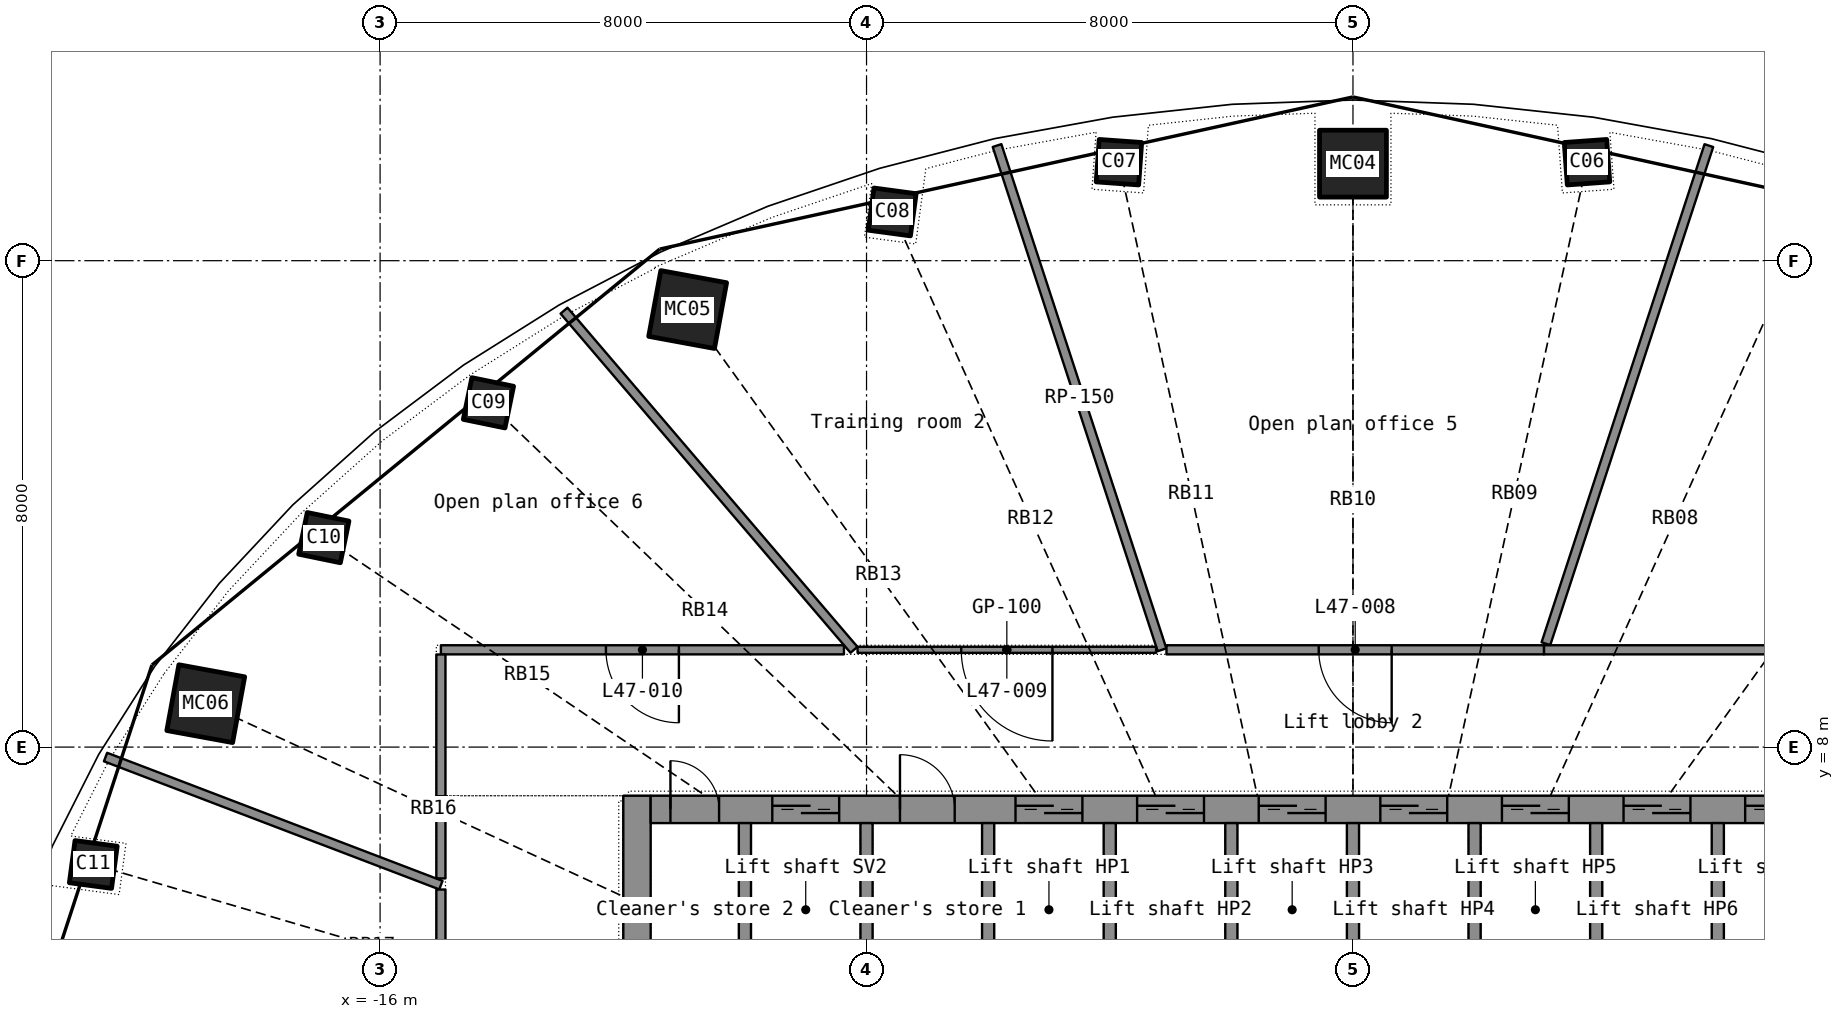
"""IFC4 building model, lengths in metres.
Left out: names, types, materials, properties, quantities, classifications, styles, units other than length and angle.
Written with IfcOpenShell. Run it as: python <this file> out.ifc"""

import sys

from ifc_helpers import new_model, si_unit, direction, frame, frame_2d, origin, origin_2d, place, context, subcontext, project, spatial, rectangle, hollow_rectangle, extrude, element, fill, save


model = new_model("IFC4")
c1 = context("Model", 3, precision=1e-05, world=origin(), true_north=direction((0.0, 1.0)))
c2 = subcontext(c1, "Body", "Model", "MODEL_VIEW")
j1 = project(units=[si_unit("LENGTHUNIT", "METRE"), si_unit("PLANEANGLEUNIT", "RADIAN")], contexts=[c1])
p1 = place(None, origin())
s1 = spatial("IfcSite", under=j1, at=p1, CompositionType="ELEMENT")
p2 = place(p1, origin())
s2 = spatial("IfcBuilding", under=s1, at=p2, CompositionType="ELEMENT")
p3 = place(p2, frame((0.0, 0.0, 194.1)))
s3 = spatial("IfcBuildingStorey", under=s2, at=p3, CompositionType="ELEMENT", Elevation=194.1)
p4 = place(p3, frame((3.849, 17.62, 0.0), z_axis=(-0.006002173, -0.027900212, 0.999592693), x_axis=(0.990171856, -0.139841068, 0.002042419)))
e1 = element("IfcColumn", 1, at=p4, inside=s3, PredefinedType="COLUMN", context=c2, shape_type="SweptSolid", body=[
    extrude(hollow_rectangle(XDim=0.7, YDim=0.7, WallThickness=0.025, at=origin_2d()), origin(), (0.0, 0.0, 1.0), 3.701),
])
p5 = place(p3, frame((0.0, 17.596, 0.0), z_axis=(0.0, -0.02836206, 0.999597716), x_axis=(1.0, 0.0, 0.0)))
e2 = element("IfcColumn", 2, at=p5, inside=s3, PredefinedType="COLUMN", context=c2, shape_type="SweptSolid", body=[
    extrude(hollow_rectangle(XDim=1.1, YDim=1.1, WallThickness=0.032, at=origin_2d()), origin(), (0.0, 0.0, 1.0), 3.701),
])
for number, where, z_axis, x_axis in (
    (3, (-3.849, 17.62, 0.0), (0.006, -0.028, 1.0), (0.99, 0.14, -0.002)),
    (4, (-7.578, 16.802, 0.0), (0.012, -0.027, 1.0), (0.96, 0.281, -0.004)),
):
    element("IfcColumn", number, at=place(p3, frame(where, z_axis=z_axis, x_axis=x_axis)), inside=s3, PredefinedType="COLUMN", context=c2, shape_type="SweptSolid", body=[
        extrude(hollow_rectangle(XDim=0.7, YDim=0.7, WallThickness=0.025, at=origin_2d()), origin(), (0.0, 0.0, 1.0), 3.701),
    ])
p6 = place(p3, frame((-10.942, 15.197, 0.0), z_axis=(0.017280237, -0.024535299, 0.999549605), x_axis=(0.908373055, 0.418125333, -0.005440522)))
e5 = element("IfcColumn", 5, at=p6, inside=s3, PredefinedType="COLUMN", context=c2, shape_type="SweptSolid", body=[
    extrude(hollow_rectangle(XDim=1.1, YDim=1.1, WallThickness=0.032, at=origin_2d()), origin(), (0.0, 0.0, 1.0), 3.702),
])
p7 = place(p3, frame((-14.218, 13.662, 0.0), z_axis=(0.022226156, -0.021698532, 0.999517469), x_axis=(0.828497152, 0.559958207, -0.00626706)))
e6 = element("IfcColumn", 6, at=p7, inside=s3, PredefinedType="COLUMN", context=c2, shape_type="SweptSolid", body=[
    extrude(hollow_rectangle(XDim=0.7, YDim=0.7, WallThickness=0.025, at=origin_2d()), origin(), (0.0, 0.0, 1.0), 3.702),
])
p8 = place(p3, frame((-16.926, 11.445, 0.0), z_axis=(0.026512179, -0.018202391, 0.999482755), x_axis=(0.720419372, 0.693508429, -0.006479727)))
e7 = element("IfcColumn", 7, at=p8, inside=s3, PredefinedType="COLUMN", context=c2, shape_type="SweptSolid", body=[
    extrude(hollow_rectangle(XDim=0.7, YDim=0.7, WallThickness=0.025, at=origin_2d()), origin(), (0.0, 0.0, 1.0), 3.702),
])
p9 = place(p3, frame((-18.867, 8.714, 0.0), z_axis=(0.029940667, -0.01417895, 0.999451106), x_axis=(0.583859188, 0.811832967, -0.005973473)))
e8 = element("IfcColumn", 8, at=p9, inside=s3, PredefinedType="COLUMN", context=c2, shape_type="SweptSolid", body=[
    extrude(hollow_rectangle(XDim=1.1, YDim=1.1, WallThickness=0.032, at=origin_2d()), origin(), (0.0, 0.0, 1.0), 3.702),
])
p10 = place(p3, frame((-20.717, 6.07, 0.0), z_axis=(0.032511791, -0.009694185, 0.999424337), x_axis=(0.410362909, 0.911911178, -0.00450399)))
e9 = element("IfcColumn", 9, at=p10, inside=s3, PredefinedType="COLUMN", context=c2, shape_type="SweptSolid", body=[
    extrude(hollow_rectangle(XDim=0.7, YDim=0.7, WallThickness=0.025, at=origin_2d()), origin(), (0.0, 0.0, 1.0), 3.702),
])
p11 = place(p3, frame((-11.775, -7.2, 0.0), z_axis=(0.0, 0.0, 1.0), x_axis=(0.0, 1.0, 0.0)))
e10 = element("IfcWall", 10, at=p11, inside=s3, PredefinedType="SHEAR", context=c2, shape_type="SweptSolid", body=[
    extrude(rectangle(XDim=14.4, YDim=0.45, at=frame_2d((7.2, 0.0))), origin(), (0.0, 0.0, 1.0), 3.3),
])
p12 = place(p11, frame((6.5, 0.0, 0.0)))
e11 = element("IfcOpeningElement", 11, at=p12, cuts=e10, PredefinedType="OPENING", context=c2, shape_type="SweptSolid", body=[
    extrude(rectangle(XDim=1.4, YDim=2.2, at=frame_2d((0.7, 1.1))), frame((0.0, 0.235, 0.0), z_axis=(0.0, -1.0, 0.0), x_axis=(1.0, 0.0, 0.0)), (0.0, 0.0, 1.0), 0.47),
])
p13 = place(p3, frame((-11.55, 6.975, 0.0), z_axis=(0.0, 0.0, 1.0), x_axis=(1.0, 0.0, 0.0)))
e12 = element("IfcWall", 12, at=p13, inside=s3, PredefinedType="SHEAR", context=c2, shape_type="SweptSolid", body=[
    extrude(rectangle(XDim=23.1, YDim=0.45, at=frame_2d((11.55, 0.0))), origin(), (0.0, 0.0, 1.0), 3.3),
])
p14 = place(p13, frame((2.0, 0.0, 0.0)))
e13 = element("IfcOpeningElement", 13, at=p14, cuts=e12, PredefinedType="OPENING", context=c2, shape_type="SweptSolid", body=[
    extrude(rectangle(XDim=1.1, YDim=2.2, at=frame_2d((0.55, 1.1))), frame((0.0, 0.235, 0.0), z_axis=(0.0, -1.0, 0.0), x_axis=(1.0, 0.0, 0.0)), (0.0, 0.0, 1.0), 0.47),
])
p15 = place(p13, frame((6.0, 0.0, 0.0)))
e14 = element("IfcOpeningElement", 14, at=p15, cuts=e12, PredefinedType="OPENING", context=c2, shape_type="SweptSolid", body=[
    extrude(rectangle(XDim=1.1, YDim=2.2, at=frame_2d((0.55, 1.1))), frame((0.0, 0.235, 0.0), z_axis=(0.0, -1.0, 0.0), x_axis=(1.0, 0.0, 0.0)), (0.0, 0.0, 1.0), 0.47),
])
p16 = place(p13, frame((8.0, 0.0, 0.0)))
e15 = element("IfcOpeningElement", 15, at=p16, cuts=e12, PredefinedType="OPENING", context=c2, shape_type="SweptSolid", body=[
    extrude(rectangle(XDim=1.1, YDim=2.2, at=frame_2d((0.55, 1.1))), frame((0.0, 0.235, 0.0), z_axis=(0.0, -1.0, 0.0), x_axis=(1.0, 0.0, 0.0)), (0.0, 0.0, 1.0), 0.47),
])
p17 = place(p13, frame((10.0, 0.0, 0.0)))
e16 = element("IfcOpeningElement", 16, at=p17, cuts=e12, PredefinedType="OPENING", context=c2, shape_type="SweptSolid", body=[
    extrude(rectangle(XDim=1.1, YDim=2.2, at=frame_2d((0.55, 1.1))), frame((0.0, 0.235, 0.0), z_axis=(0.0, -1.0, 0.0), x_axis=(1.0, 0.0, 0.0)), (0.0, 0.0, 1.0), 0.47),
])
p18 = place(p13, frame((12.0, 0.0, 0.0)))
e17 = element("IfcOpeningElement", 17, at=p18, cuts=e12, PredefinedType="OPENING", context=c2, shape_type="SweptSolid", body=[
    extrude(rectangle(XDim=1.1, YDim=2.2, at=frame_2d((0.55, 1.1))), frame((0.0, 0.235, 0.0), z_axis=(0.0, -1.0, 0.0), x_axis=(1.0, 0.0, 0.0)), (0.0, 0.0, 1.0), 0.47),
])
p19 = place(p13, frame((14.0, 0.0, 0.0)))
e18 = element("IfcOpeningElement", 18, at=p19, cuts=e12, PredefinedType="OPENING", context=c2, shape_type="SweptSolid", body=[
    extrude(rectangle(XDim=1.1, YDim=2.2, at=frame_2d((0.55, 1.1))), frame((0.0, 0.235, 0.0), z_axis=(0.0, -1.0, 0.0), x_axis=(1.0, 0.0, 0.0)), (0.0, 0.0, 1.0), 0.47),
])
p20 = place(p13, frame((16.0, 0.0, 0.0)))
e19 = element("IfcOpeningElement", 19, at=p20, cuts=e12, PredefinedType="OPENING", context=c2, shape_type="SweptSolid", body=[
    extrude(rectangle(XDim=1.1, YDim=2.2, at=frame_2d((0.55, 1.1))), frame((0.0, 0.235, 0.0), z_axis=(0.0, -1.0, 0.0), x_axis=(1.0, 0.0, 0.0)), (0.0, 0.0, 1.0), 0.47),
])
p21 = place(p13, frame((18.0, 0.0, 0.0)))
e20 = element("IfcOpeningElement", 20, at=p21, cuts=e12, PredefinedType="OPENING", context=c2, shape_type="SweptSolid", body=[
    extrude(rectangle(XDim=1.1, YDim=2.2, at=frame_2d((0.55, 1.1))), frame((0.0, 0.235, 0.0), z_axis=(0.0, -1.0, 0.0), x_axis=(1.0, 0.0, 0.0)), (0.0, 0.0, 1.0), 0.47),
])
p22 = place(p13, frame((20.0, 0.0, 0.0)))
e21 = element("IfcOpeningElement", 21, at=p22, cuts=e12, PredefinedType="OPENING", context=c2, shape_type="SweptSolid", body=[
    extrude(rectangle(XDim=1.1, YDim=2.2, at=frame_2d((0.55, 1.1))), frame((0.0, 0.235, 0.0), z_axis=(0.0, -1.0, 0.0), x_axis=(1.0, 0.0, 0.0)), (0.0, 0.0, 1.0), 0.47),
])
p23 = place(p13, frame((4.1, 0.0, 0.0)))
e22 = element("IfcOpeningElement", 22, at=p23, cuts=e12, PredefinedType="OPENING", context=c2, shape_type="SweptSolid", body=[
    extrude(rectangle(XDim=0.9, YDim=2.1, at=frame_2d((0.45, 1.05))), frame((0.0, 0.235, 0.0), z_axis=(0.0, -1.0, 0.0), x_axis=(1.0, 0.0, 0.0)), (0.0, 0.0, 1.0), 0.47),
])
p24 = place(p13, frame((0.325, 0.0, 0.0)))
e23 = element("IfcOpeningElement", 23, at=p24, cuts=e12, PredefinedType="OPENING", context=c2, shape_type="SweptSolid", body=[
    extrude(rectangle(XDim=0.8, YDim=2.05, at=frame_2d((0.4, 1.025))), frame((0.0, 0.235, 0.0), z_axis=(0.0, -1.0, 0.0), x_axis=(1.0, 0.0, 0.0)), (0.0, 0.0, 1.0), 0.47),
])
p25 = place(p13, frame((21.975, 0.0, 0.0)))
e24 = element("IfcOpeningElement", 24, at=p25, cuts=e12, PredefinedType="OPENING", context=c2, shape_type="SweptSolid", body=[
    extrude(rectangle(XDim=0.8, YDim=2.05, at=frame_2d((0.4, 1.025))), frame((0.0, 0.235, 0.0), z_axis=(0.0, -1.0, 0.0), x_axis=(1.0, 0.0, 0.0)), (0.0, 0.0, 1.0), 0.47),
])
for number, where, z_axis, x_axis in (
    (25, (-10.0, 3.9, 0.0), (0.0, 0.0, 1.0), (0.0, 1.0, 0.0)),
    (26, (-8.0, 3.9, 0.0), (0.0, 0.0, 1.0), (0.0, 1.0, 0.0)),
    (27, (-6.0, 3.9, 0.0), (0.0, 0.0, 1.0), (0.0, 1.0, 0.0)),
    (28, (-4.0, 3.9, 0.0), (0.0, 0.0, 1.0), (0.0, 1.0, 0.0)),
    (29, (-2.0, 3.9, 0.0), (0.0, 0.0, 1.0), (0.0, 1.0, 0.0)),
    (30, (0.0, 3.9, 0.0), (0.0, 0.0, 1.0), (0.0, 1.0, 0.0)),
    (31, (2.0, 3.9, 0.0), (0.0, 0.0, 1.0), (0.0, 1.0, 0.0)),
    (32, (4.0, 3.9, 0.0), (0.0, 0.0, 1.0), (0.0, 1.0, 0.0)),
    (33, (6.0, 3.9, 0.0), (0.0, 0.0, 1.0), (0.0, 1.0, 0.0)),
):
    element("IfcWall", number, at=place(p3, frame(where, z_axis=z_axis, x_axis=x_axis)), inside=s3, PredefinedType="SHEAR", context=c2, shape_type="SweptSolid", body=[
        extrude(rectangle(XDim=2.85, YDim=0.2, at=frame_2d((1.425, 0.0))), origin(), (0.0, 0.0, 1.0), 3.3),
    ])
p26 = place(p3, frame((15.0, 9.6, 0.0), z_axis=(0.0, 0.0, 1.0), x_axis=(-1.0, 0.0, 0.0)))
e34 = element("IfcWall", 34, at=p26, inside=s3, PredefinedType="PARTITIONING", context=c2, shape_type="SweptSolid", body=[
    extrude(rectangle(XDim=11.86, YDim=0.15, at=frame_2d((5.93, 0.0))), origin(), (0.0, 0.0, 1.0), 2.4),
])
p27 = place(p26, frame((5.33, 0.0, 0.0)))
e35 = element("IfcOpeningElement", 35, at=p27, cuts=e34, PredefinedType="OPENING", context=c2, shape_type="SweptSolid", body=[
    extrude(rectangle(XDim=1.2, YDim=2.2, at=frame_2d((0.6, 1.1))), frame((0.0, 0.085, 0.0), z_axis=(0.0, -1.0, 0.0), x_axis=(1.0, 0.0, 0.0)), (0.0, 0.0, 1.0), 0.17),
])
p28 = place(p3, frame((-5.854, 17.894, 0.0), z_axis=(0.0, 0.0, 1.0), x_axis=(0.310918216, -0.95043667, 0.0)))
e36 = element("IfcWall", 36, at=p28, inside=s3, PredefinedType="PARTITIONING", context=c2, shape_type="SweptSolid", body=[
    extrude(rectangle(XDim=8.726, YDim=0.15, at=frame_2d((4.363, 0.0))), origin(), (0.0, 0.0, 1.0), 2.4),
])
p29 = place(p3, frame((5.853, 17.893, 0.0), z_axis=(0.0, 0.0, 1.0), x_axis=(-0.310929285, -0.950433049, 0.0)))
e37 = element("IfcWall", 37, at=p29, inside=s3, PredefinedType="PARTITIONING", context=c2, shape_type="SweptSolid", body=[
    extrude(rectangle(XDim=8.62, YDim=0.15, at=frame_2d((4.31, 0.0))), origin(), (0.0, 0.0, 1.0), 2.4),
])
p30 = place(p3, frame((-12.975, 15.178, 0.0), z_axis=(0.0, 0.0, 1.0), x_axis=(0.649790761, -0.760113128, 0.0)))
e38 = element("IfcWall", 38, at=p30, inside=s3, PredefinedType="PARTITIONING", context=c2, shape_type="SweptSolid", body=[
    extrude(rectangle(XDim=7.338, YDim=0.15, at=frame_2d((3.669, 0.0))), origin(), (0.0, 0.0, 1.0), 2.4),
])
p31 = place(p3, frame((-8.371, 9.6, 0.0), z_axis=(0.0, 0.0, 1.0), x_axis=(-1.0, 0.0, 0.0)))
e39 = element("IfcWall", 39, at=p31, inside=s3, PredefinedType="PARTITIONING", context=c2, shape_type="SweptSolid", body=[
    extrude(rectangle(XDim=6.629, YDim=0.15, at=frame_2d((3.314, 0.0))), origin(), (0.0, 0.0, 1.0), 2.4),
])
p32 = place(p31, frame((2.714, 0.0, 0.0)))
e40 = element("IfcOpeningElement", 40, at=p32, cuts=e39, PredefinedType="OPENING", context=c2, shape_type="SweptSolid", body=[
    extrude(rectangle(XDim=1.2, YDim=2.2, at=frame_2d((0.6, 1.1))), frame((0.0, 0.085, 0.0), z_axis=(0.0, -1.0, 0.0), x_axis=(1.0, 0.0, 0.0)), (0.0, 0.0, 1.0), 0.17),
])
p33 = place(p3, frame((3.14, 9.6, 0.0), z_axis=(0.0, 0.0, 1.0), x_axis=(-1.0, 0.0, 0.0)))
e41 = element("IfcWall", 41, at=p33, inside=s3, PredefinedType="PARTITIONING", context=c2, shape_type="SweptSolid", body=[
    extrude(rectangle(XDim=6.208, YDim=0.15, at=frame_2d((3.104, 0.0))), origin(), (0.0, 0.0, 1.0), 2.4),
])
p34 = place(p33, frame((2.504, 0.0, 0.0)))
e42 = element("IfcOpeningElement", 42, at=p34, cuts=e41, PredefinedType="OPENING", context=c2, shape_type="SweptSolid", body=[
    extrude(rectangle(XDim=1.2, YDim=2.2, at=frame_2d((0.6, 1.1))), frame((0.0, 0.085, 0.0), z_axis=(0.0, -1.0, 0.0), x_axis=(1.0, 0.0, 0.0)), (0.0, 0.0, 1.0), 0.17),
])
p35 = place(p3, frame((-20.515, 7.836, 0.0), z_axis=(0.0, 0.0, 1.0), x_axis=(0.934186062, -0.356786213, 0.0)))
e43 = element("IfcWall", 43, at=p35, inside=s3, PredefinedType="PARTITIONING", context=c2, shape_type="SweptSolid", body=[
    extrude(rectangle(XDim=5.904, YDim=0.15, at=frame_2d((2.952, 0.0))), origin(), (0.0, 0.0, 1.0), 2.4),
])
p36 = place(p3, frame((-3.238, 9.6, 0.0), z_axis=(0.0, 0.0, 1.0), x_axis=(-1.0, 0.0, 0.0)))
e44 = element("IfcWall", 44, at=p36, inside=s3, PredefinedType="PARTITIONING", context=c2, shape_type="SweptSolid", body=[
    extrude(rectangle(XDim=4.91, YDim=0.1, at=frame_2d((2.455, 0.0))), origin(), (0.0, 0.0, 1.0), 2.4),
])
p37 = place(p36, frame((1.705, 0.0, 0.0)))
e45 = element("IfcOpeningElement", 45, at=p37, cuts=e44, PredefinedType="OPENING", context=c2, shape_type="SweptSolid", body=[
    extrude(rectangle(XDim=1.5, YDim=2.4, at=frame_2d((0.75, 1.2))), frame((0.0, 0.06, 0.0), z_axis=(0.0, -1.0, 0.0), x_axis=(1.0, 0.0, 0.0)), (0.0, 0.0, 1.0), 0.12),
])
p38 = place(p3, frame((-15.0, 5.657, 0.0), z_axis=(0.0, 0.0, 1.0), x_axis=(0.0, -1.0, 0.0)))
e46 = element("IfcWall", 46, at=p38, inside=s3, PredefinedType="PARTITIONING", context=c2, shape_type="SweptSolid", body=[
    extrude(rectangle(XDim=3.78, YDim=0.15, at=frame_2d((1.89, 0.0))), origin(), (0.0, 0.0, 1.0), 2.4),
])
p39 = place(p3, frame((-15.0, 9.523, 0.0), z_axis=(0.0, 0.0, 1.0), x_axis=(0.0, -1.0, 0.0)))
e47 = element("IfcWall", 47, at=p39, inside=s3, PredefinedType="PARTITIONING", context=c2, shape_type="SweptSolid", body=[
    extrude(rectangle(XDim=2.335, YDim=0.15, at=frame_2d((1.167, 0.0))), origin(), (0.0, 0.0, 1.0), 2.4),
])
p40 = place(p3, frame((-15.0, 7.187, 0.0), z_axis=(0.0, 0.0, 1.0), x_axis=(0.0, -1.0, 0.0)))
e48 = element("IfcWall", 48, at=p40, inside=s3, PredefinedType="PARTITIONING", context=c2, shape_type="SweptSolid", body=[
    extrude(rectangle(XDim=1.347, YDim=0.15, at=frame_2d((0.673, 0.0))), origin(), (0.0, 0.0, 1.0), 2.4),
])
p41 = place(p14, origin())
e49 = element("IfcDoor", 49, at=p41, inside=s3, OperationType="DOUBLE_DOOR_SLIDING", PredefinedType="DOOR", context=c2, shape_type="SweptSolid", body=[
    extrude(rectangle(XDim=1.1, YDim=2.2, at=frame_2d((0.55, 1.1))), frame((0.0, 0.025, 0.0), z_axis=(0.0, -1.0, 0.0), x_axis=(1.0, 0.0, 0.0)), (0.0, 0.0, 1.0), 0.05),
])
fill(e13, e49)
p42 = place(p15, origin())
e50 = element("IfcDoor", 50, at=p42, inside=s3, OperationType="DOUBLE_DOOR_SLIDING", PredefinedType="DOOR", context=c2, shape_type="SweptSolid", body=[
    extrude(rectangle(XDim=1.1, YDim=2.2, at=frame_2d((0.55, 1.1))), frame((0.0, 0.025, 0.0), z_axis=(0.0, -1.0, 0.0), x_axis=(1.0, 0.0, 0.0)), (0.0, 0.0, 1.0), 0.05),
])
fill(e14, e50)
p43 = place(p16, origin())
e51 = element("IfcDoor", 51, at=p43, inside=s3, OperationType="DOUBLE_DOOR_SLIDING", PredefinedType="DOOR", context=c2, shape_type="SweptSolid", body=[
    extrude(rectangle(XDim=1.1, YDim=2.2, at=frame_2d((0.55, 1.1))), frame((0.0, 0.025, 0.0), z_axis=(0.0, -1.0, 0.0), x_axis=(1.0, 0.0, 0.0)), (0.0, 0.0, 1.0), 0.05),
])
fill(e15, e51)
p44 = place(p17, origin())
e52 = element("IfcDoor", 52, at=p44, inside=s3, OperationType="DOUBLE_DOOR_SLIDING", PredefinedType="DOOR", context=c2, shape_type="SweptSolid", body=[
    extrude(rectangle(XDim=1.1, YDim=2.2, at=frame_2d((0.55, 1.1))), frame((0.0, 0.025, 0.0), z_axis=(0.0, -1.0, 0.0), x_axis=(1.0, 0.0, 0.0)), (0.0, 0.0, 1.0), 0.05),
])
fill(e16, e52)
p45 = place(p18, origin())
e53 = element("IfcDoor", 53, at=p45, inside=s3, OperationType="DOUBLE_DOOR_SLIDING", PredefinedType="DOOR", context=c2, shape_type="SweptSolid", body=[
    extrude(rectangle(XDim=1.1, YDim=2.2, at=frame_2d((0.55, 1.1))), frame((0.0, 0.025, 0.0), z_axis=(0.0, -1.0, 0.0), x_axis=(1.0, 0.0, 0.0)), (0.0, 0.0, 1.0), 0.05),
])
fill(e17, e53)
p46 = place(p19, origin())
e54 = element("IfcDoor", 54, at=p46, inside=s3, OperationType="DOUBLE_DOOR_SLIDING", PredefinedType="DOOR", context=c2, shape_type="SweptSolid", body=[
    extrude(rectangle(XDim=1.1, YDim=2.2, at=frame_2d((0.55, 1.1))), frame((0.0, 0.025, 0.0), z_axis=(0.0, -1.0, 0.0), x_axis=(1.0, 0.0, 0.0)), (0.0, 0.0, 1.0), 0.05),
])
fill(e18, e54)
p47 = place(p20, origin())
e55 = element("IfcDoor", 55, at=p47, inside=s3, OperationType="DOUBLE_DOOR_SLIDING", PredefinedType="DOOR", context=c2, shape_type="SweptSolid", body=[
    extrude(rectangle(XDim=1.1, YDim=2.2, at=frame_2d((0.55, 1.1))), frame((0.0, 0.025, 0.0), z_axis=(0.0, -1.0, 0.0), x_axis=(1.0, 0.0, 0.0)), (0.0, 0.0, 1.0), 0.05),
])
fill(e19, e55)
p48 = place(p21, origin())
e56 = element("IfcDoor", 56, at=p48, inside=s3, OperationType="DOUBLE_DOOR_SLIDING", PredefinedType="DOOR", context=c2, shape_type="SweptSolid", body=[
    extrude(rectangle(XDim=1.1, YDim=2.2, at=frame_2d((0.55, 1.1))), frame((0.0, 0.025, 0.0), z_axis=(0.0, -1.0, 0.0), x_axis=(1.0, 0.0, 0.0)), (0.0, 0.0, 1.0), 0.05),
])
fill(e20, e56)
p49 = place(p23, origin())
e57 = element("IfcDoor", 57, at=p49, inside=s3, OperationType="SINGLE_SWING_LEFT", PredefinedType="DOOR", context=c2, shape_type="SweptSolid", body=[
    extrude(rectangle(XDim=0.9, YDim=2.1, at=frame_2d((0.45, 1.05))), frame((0.0, 0.025, 0.0), z_axis=(0.0, -1.0, 0.0), x_axis=(1.0, 0.0, 0.0)), (0.0, 0.0, 1.0), 0.05),
])
fill(e22, e57)
p50 = place(p24, origin())
e58 = element("IfcDoor", 58, at=p50, inside=s3, OperationType="SINGLE_SWING_LEFT", PredefinedType="DOOR", context=c2, shape_type="SweptSolid", body=[
    extrude(rectangle(XDim=0.8, YDim=2.05, at=frame_2d((0.4, 1.025))), frame((0.0, 0.025, 0.0), z_axis=(0.0, -1.0, 0.0), x_axis=(1.0, 0.0, 0.0)), (0.0, 0.0, 1.0), 0.05),
])
fill(e23, e58)
p51 = place(p34, origin())
e59 = element("IfcDoor", 59, at=p51, inside=s3, OperationType="DOUBLE_DOOR_SINGLE_SWING", PredefinedType="DOOR", context=c2, shape_type="SweptSolid", body=[
    extrude(rectangle(XDim=1.2, YDim=2.2, at=frame_2d((0.6, 1.1))), frame((0.0, 0.025, 0.0), z_axis=(0.0, -1.0, 0.0), x_axis=(1.0, 0.0, 0.0)), (0.0, 0.0, 1.0), 0.05),
])
fill(e42, e59)
p52 = place(p37, origin())
e60 = element("IfcDoor", 60, at=p52, inside=s3, OperationType="DOUBLE_DOOR_SINGLE_SWING", PredefinedType="DOOR", context=c2, shape_type="SweptSolid", body=[
    extrude(rectangle(XDim=1.5, YDim=2.4, at=frame_2d((0.75, 1.2))), frame((0.0, 0.025, 0.0), z_axis=(0.0, -1.0, 0.0), x_axis=(1.0, 0.0, 0.0)), (0.0, 0.0, 1.0), 0.05),
])
fill(e45, e60)
p53 = place(p32, origin())
e61 = element("IfcDoor", 61, at=p53, inside=s3, OperationType="DOUBLE_DOOR_SINGLE_SWING", PredefinedType="DOOR", context=c2, shape_type="SweptSolid", body=[
    extrude(rectangle(XDim=1.2, YDim=2.2, at=frame_2d((0.6, 1.1))), frame((0.0, 0.025, 0.0), z_axis=(0.0, -1.0, 0.0), x_axis=(1.0, 0.0, 0.0)), (0.0, 0.0, 1.0), 0.05),
])
fill(e40, e61)
save(model, sys.argv[1])
